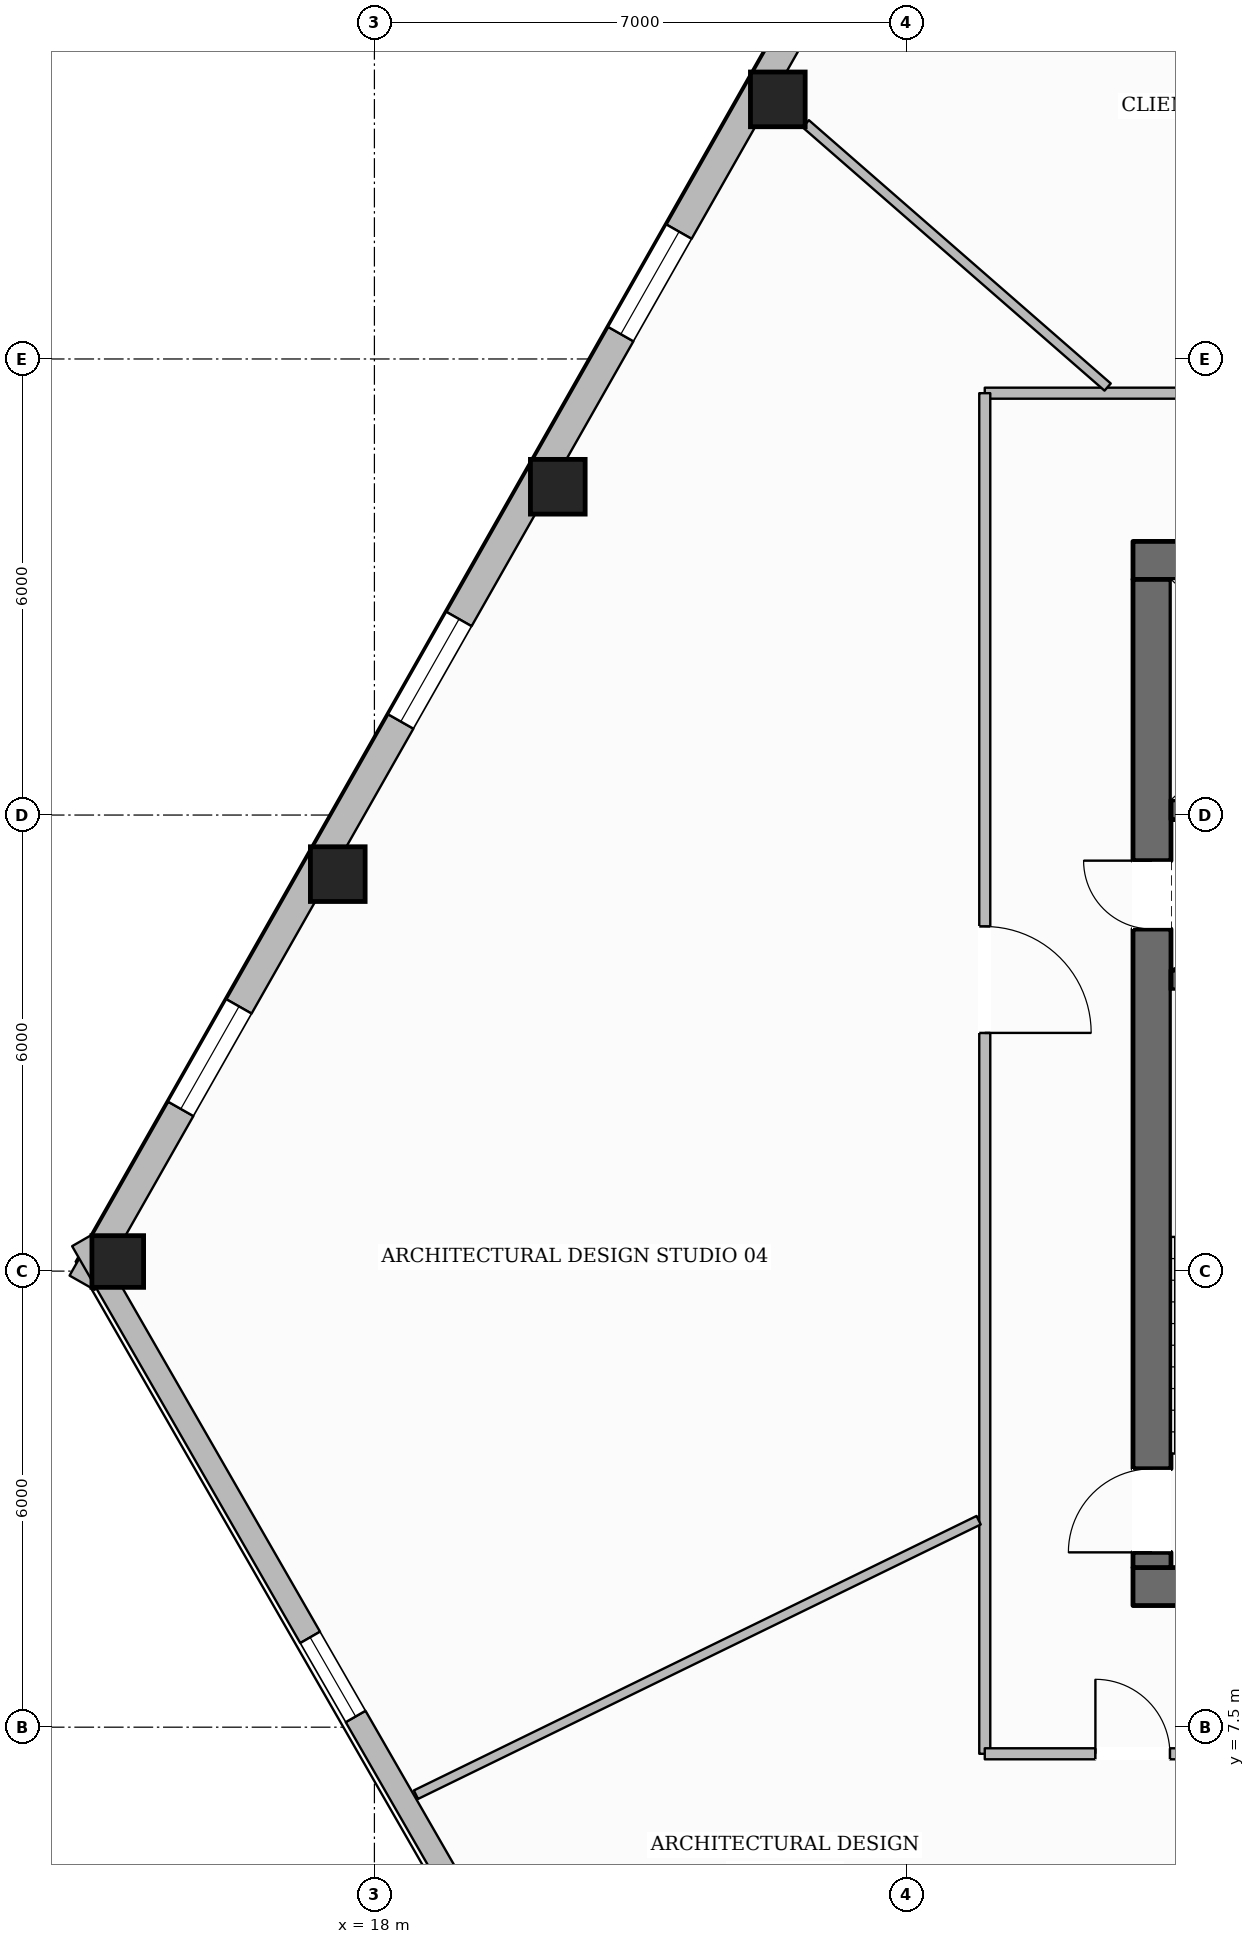
"""IFC4 building model, lengths in metres.
Left out: names, types, materials, properties, quantities, classifications, styles, units other than length and angle.
Written with IfcOpenShell. Run it as: python <this file> out.ifc"""

import sys

from ifc_helpers import new_model, si_unit, direction, frame, frame_2d, origin, origin_2d, place, context, subcontext, project, spatial, rectangle, hollow_rectangle, extrude, element, fill, save


model = new_model("IFC4")
c1 = context("Model", 3, precision=1e-05, world=origin(), true_north=direction((0.0, 1.0)))
c2 = subcontext(c1, "Body", "Model", "MODEL_VIEW")
j1 = project(units=[si_unit("LENGTHUNIT", "METRE"), si_unit("PLANEANGLEUNIT", "RADIAN")], contexts=[c1])
p1 = place(None, origin())
s1 = spatial("IfcSite", under=j1, at=p1, CompositionType="ELEMENT")
p2 = place(p1, origin())
s2 = spatial("IfcBuilding", under=s1, at=p2, CompositionType="ELEMENT")
p3 = place(p2, frame((0.0, 0.0, 108.6)))
s3 = spatial("IfcBuildingStorey", under=s2, at=p3, CompositionType="ELEMENT", Elevation=108.6)
p4 = place(p3, frame((27.98, 9.35, 0.0), z_axis=(0.0, 0.0, 1.0), x_axis=(1.0, 0.0, 0.0)))
e1 = element("IfcWall", 1, at=p4, inside=s3, PredefinedType="SOLIDWALL", context=c2, shape_type="SweptSolid", body=[
    extrude(rectangle(XDim=20.04, YDim=0.5, at=frame_2d((10.02, 0.0))), origin(), (0.0, 0.0, 1.0), 3.6),
])
p5 = place(p4, frame((10.52, 0.0, 0.0)))
e2 = element("IfcOpeningElement", 2, at=p5, cuts=e1, PredefinedType="OPENING", context=c2, shape_type="SweptSolid", body=[
    extrude(rectangle(XDim=1.4, YDim=2.2, at=frame_2d((0.7, 1.1))), frame((0.0, 0.26, 0.0), z_axis=(0.0, -1.0, 0.0), x_axis=(1.0, 0.0, 0.0)), (0.0, 0.0, 1.0), 0.52),
])
p6 = place(p3, frame((27.98, 22.85, 0.0), z_axis=(0.0, 0.0, 1.0), x_axis=(1.0, 0.0, 0.0)))
e3 = element("IfcWall", 3, at=p6, inside=s3, PredefinedType="SOLIDWALL", context=c2, shape_type="SweptSolid", body=[
    extrude(rectangle(XDim=20.04, YDim=0.5, at=frame_2d((10.02, 0.0))), origin(), (0.0, 0.0, 1.0), 3.6),
])
p7 = place(p6, frame((6.295, 0.0, 0.0)))
e4 = element("IfcOpeningElement", 4, at=p7, cuts=e3, PredefinedType="OPENING", context=c2, shape_type="SweptSolid", body=[
    extrude(rectangle(XDim=1.05, YDim=2.15, at=frame_2d((0.525, 1.075))), frame((0.0, 0.26, 0.0), z_axis=(0.0, -1.0, 0.0), x_axis=(1.0, 0.0, 0.0)), (0.0, 0.0, 1.0), 0.52),
])
p8 = place(p6, frame((12.695, 0.0, 0.0)))
e5 = element("IfcOpeningElement", 5, at=p8, cuts=e3, PredefinedType="OPENING", context=c2, shape_type="SweptSolid", body=[
    extrude(rectangle(XDim=1.05, YDim=2.15, at=frame_2d((0.525, 1.075))), frame((0.0, 0.26, 0.0), z_axis=(0.0, -1.0, 0.0), x_axis=(1.0, 0.0, 0.0)), (0.0, 0.0, 1.0), 0.52),
])
p9 = place(p3, frame((28.23, 9.6, 0.0), z_axis=(0.0, 0.0, 1.0), x_axis=(0.0, 1.0, 0.0)))
e6 = element("IfcWall", 6, at=p9, inside=s3, PredefinedType="SOLIDWALL", context=c2, shape_type="SweptSolid", body=[
    extrude(rectangle(XDim=13.0, YDim=0.5, at=frame_2d((6.5, 0.0))), origin(), (0.0, 0.0, 1.0), 3.6),
])
p10 = place(p9, frame((0.2, 0.0, 0.0)))
e7 = element("IfcOpeningElement", 7, at=p10, cuts=e6, PredefinedType="OPENING", context=c2, shape_type="SweptSolid", body=[
    extrude(rectangle(XDim=1.1, YDim=2.15, at=frame_2d((0.55, 1.075))), frame((0.0, 0.26, 0.0), z_axis=(0.0, -1.0, 0.0), x_axis=(1.0, 0.0, 0.0)), (0.0, 0.0, 1.0), 0.52),
])
p11 = place(p9, frame((8.4, 0.0, 0.0)))
e8 = element("IfcOpeningElement", 8, at=p11, cuts=e6, PredefinedType="OPENING", context=c2, shape_type="SweptSolid", body=[
    extrude(rectangle(XDim=0.9, YDim=2.1, at=frame_2d((0.45, 1.05))), frame((0.0, 0.26, 0.0), z_axis=(0.0, -1.0, 0.0), x_axis=(1.0, 0.0, 0.0)), (0.0, 0.0, 1.0), 0.52),
])
for number, where, z_axis, x_axis in (
    (9, (28.48, 17.33, 0.0), (0.0, 0.0, 1.0), (1.0, 0.0, 0.0)),
    (10, (28.48, 19.57, 0.0), (0.0, 0.0, 1.0), (1.0, 0.0, 0.0)),
):
    element("IfcWall", number, at=place(p3, frame(where, z_axis=z_axis, x_axis=x_axis)), inside=s3, PredefinedType="SHEAR", context=c2, shape_type="SweptSolid", body=[
        extrude(rectangle(XDim=3.2, YDim=0.26, at=frame_2d((1.6, 0.0))), origin(), (0.0, 0.0, 1.0), 3.6),
    ])
for number, where, z_axis, x_axis in (
    (11, (23.307, 28.915, 0.0), (0.0, 0.0, 1.0), (1.0, 0.0, 0.0)),
    (12, (20.413, 23.819, 0.0), (0.0, 0.0, 1.0), (1.0, 0.0, 0.0)),
    (13, (17.518, 18.723, 0.0), (0.0, 0.0, 1.0), (1.0, 0.0, 0.0)),
):
    element("IfcColumn", number, at=place(p3, frame(where, z_axis=z_axis, x_axis=x_axis)), inside=s3, PredefinedType="COLUMN", context=c2, shape_type="SweptSolid", body=[
        extrude(hollow_rectangle(XDim=0.72, YDim=0.72, WallThickness=0.032, at=origin_2d()), origin(), (0.0, 0.0, 1.0), 3.6),
    ])
p12 = place(p3, frame((14.624, 13.626, 0.0), z_axis=(0.0, 0.0, 1.0), x_axis=(1.0, 0.0, 0.0)))
e14 = element("IfcColumn", 14, at=p12, inside=s3, PredefinedType="COLUMN", context=c2, shape_type="SweptSolid", body=[
    extrude(hollow_rectangle(XDim=0.68, YDim=0.68, WallThickness=0.03, at=origin_2d()), origin(), (0.0, 0.0, 1.0), 3.6),
])
p13 = place(p3, frame((14.155, 13.347, 0.0), z_axis=(0.0, 0.0, 1.0), x_axis=(0.493868426836, 0.869536644986, 0.0)))
e15 = element("IfcWall", 15, at=p13, inside=s3, PredefinedType="STANDARD", context=c2, shape_type="SweptSolid", body=[
    extrude(rectangle(XDim=36.121, YDim=0.38, at=frame_2d((18.061, 0.0))), origin(), (0.0, 0.0, 1.0), 3.059),
])
p14 = place(p13, frame((31.935, 0.0, 0.65)))
e16 = element("IfcOpeningElement", 16, at=p14, cuts=e15, PredefinedType="OPENING", context=c2, shape_type="SweptSolid", body=[
    extrude(rectangle(XDim=1.55, YDim=1.75, at=frame_2d((0.775, 0.875))), frame((0.0, 0.2, 0.0), z_axis=(0.0, -1.0, 0.0), x_axis=(1.0, 0.0, 0.0)), (0.0, 0.0, 1.0), 0.4),
])
p15 = place(p13, frame((26.073, 0.0, 0.65)))
e17 = element("IfcOpeningElement", 17, at=p15, cuts=e15, PredefinedType="OPENING", context=c2, shape_type="SweptSolid", body=[
    extrude(rectangle(XDim=1.55, YDim=1.75, at=frame_2d((0.775, 0.875))), frame((0.0, 0.2, 0.0), z_axis=(0.0, -1.0, 0.0), x_axis=(1.0, 0.0, 0.0)), (0.0, 0.0, 1.0), 0.4),
])
p16 = place(p13, frame((14.352, 0.0, 0.65)))
e18 = element("IfcOpeningElement", 18, at=p16, cuts=e15, PredefinedType="OPENING", context=c2, shape_type="SweptSolid", body=[
    extrude(rectangle(XDim=1.55, YDim=1.75, at=frame_2d((0.775, 0.875))), frame((0.0, 0.2, 0.0), z_axis=(0.0, -1.0, 0.0), x_axis=(1.0, 0.0, 0.0)), (0.0, 0.0, 1.0), 0.4),
])
p17 = place(p13, frame((8.491, 0.0, 0.65)))
e19 = element("IfcOpeningElement", 19, at=p17, cuts=e15, PredefinedType="OPENING", context=c2, shape_type="SweptSolid", body=[
    extrude(rectangle(XDim=1.55, YDim=1.75, at=frame_2d((0.775, 0.875))), frame((0.0, 0.2, 0.0), z_axis=(0.0, -1.0, 0.0), x_axis=(1.0, 0.0, 0.0)), (0.0, 0.0, 1.0), 0.4),
])
p18 = place(p13, frame((2.63, 0.0, 0.65)))
e20 = element("IfcOpeningElement", 20, at=p18, cuts=e15, PredefinedType="OPENING", context=c2, shape_type="SweptSolid", body=[
    extrude(rectangle(XDim=1.55, YDim=1.75, at=frame_2d((0.775, 0.875))), frame((0.0, 0.2, 0.0), z_axis=(0.0, -1.0, 0.0), x_axis=(1.0, 0.0, 0.0)), (0.0, 0.0, 1.0), 0.4),
])
p19 = place(p3, frame((20.754, 2.419, 0.0), z_axis=(0.0, 0.0, 1.0), x_axis=(-0.49837034912, 0.866964240969, 0.0)))
e21 = element("IfcWall", 21, at=p19, inside=s3, PredefinedType="STANDARD", context=c2, shape_type="SweptSolid", body=[
    extrude(rectangle(XDim=13.246, YDim=0.3, at=frame_2d((6.623, 0.0))), origin(), (0.0, 0.0, 1.0), 3.059),
])
p20 = place(p19, frame((6.023, 0.0, 0.65)))
e22 = element("IfcOpeningElement", 22, at=p20, cuts=e21, PredefinedType="OPENING", context=c2, shape_type="SweptSolid", body=[
    extrude(rectangle(XDim=1.2, YDim=1.7, at=frame_2d((0.6, 0.85))), frame((0.0, 0.16, 0.0), z_axis=(0.0, -1.0, 0.0), x_axis=(1.0, 0.0, 0.0)), (0.0, 0.0, 1.0), 0.32),
])
p21 = place(p3, frame((49.97, 25.05, 0.0), z_axis=(0.0, 0.0, 1.0), x_axis=(-1.0, 0.0, 0.0)))
e23 = element("IfcWall", 23, at=p21, inside=s3, PredefinedType="PARTITIONING", context=c2, shape_type="SweptSolid", body=[
    extrude(rectangle(XDim=23.94, YDim=0.145, at=frame_2d((11.97, 0.0))), origin(), (0.0, 0.0, 1.0), 3.6),
])
p22 = place(p21, frame((5.824, 0.0, 0.0)))
e24 = element("IfcOpeningElement", 24, at=p22, cuts=e23, PredefinedType="OPENING", context=c2, shape_type="SweptSolid", body=[
    extrude(rectangle(XDim=1.4, YDim=2.2, at=frame_2d((0.7, 1.1))), frame((0.0, 0.083, 0.0), z_axis=(0.0, -1.0, 0.0), x_axis=(1.0, 0.0, 0.0)), (0.0, 0.0, 1.0), 0.165),
])
p23 = place(p21, frame((16.238, 0.0, 0.0)))
e25 = element("IfcOpeningElement", 25, at=p23, cuts=e23, PredefinedType="OPENING", context=c2, shape_type="SweptSolid", body=[
    extrude(rectangle(XDim=1.4, YDim=2.2, at=frame_2d((0.7, 1.1))), frame((0.0, 0.083, 0.0), z_axis=(0.0, -1.0, 0.0), x_axis=(1.0, 0.0, 0.0)), (0.0, 0.0, 1.0), 0.165),
])
p24 = place(p3, frame((26.03, 25.05, 0.0), z_axis=(0.0, 0.0, 1.0), x_axis=(0.0, -1.0, 0.0)))
e26 = element("IfcWall", 26, at=p24, inside=s3, PredefinedType="PARTITIONING", context=c2, shape_type="SweptSolid", body=[
    extrude(rectangle(XDim=17.9, YDim=0.145, at=frame_2d((8.95, 0.0))), origin(), (0.0, 0.0, 1.0), 3.288),
])
p25 = place(p24, frame((7.016, 0.0, 0.0)))
e27 = element("IfcOpeningElement", 27, at=p25, cuts=e26, PredefinedType="OPENING", context=c2, shape_type="SweptSolid", body=[
    extrude(rectangle(XDim=1.4, YDim=2.2, at=frame_2d((0.7, 1.1))), frame((0.0, 0.083, 0.0), z_axis=(0.0, -1.0, 0.0), x_axis=(1.0, 0.0, 0.0)), (0.0, 0.0, 1.0), 0.165),
])
p26 = place(p3, frame((26.03, 7.15, 0.0), z_axis=(0.0, 0.0, 1.0), x_axis=(1.0, 0.0, 0.0)))
e28 = element("IfcWall", 28, at=p26, inside=s3, PredefinedType="PARTITIONING", context=c2, shape_type="SweptSolid", body=[
    extrude(rectangle(XDim=23.94, YDim=0.145, at=frame_2d((11.97, 0.0))), origin(), (0.0, 0.0, 1.0), 3.6),
])
p27 = place(p26, frame((4.53, 0.0, 0.0)))
e29 = element("IfcOpeningElement", 29, at=p27, cuts=e28, PredefinedType="OPENING", context=c2, shape_type="SweptSolid", body=[
    extrude(rectangle(XDim=0.88, YDim=2.1, at=frame_2d((0.44, 1.05))), frame((0.0, 0.083, 0.0), z_axis=(0.0, -1.0, 0.0), x_axis=(1.0, 0.0, 0.0)), (0.0, 0.0, 1.0), 0.165),
])
p28 = place(p26, frame((7.05, 0.0, 0.0)))
e30 = element("IfcOpeningElement", 30, at=p28, cuts=e28, PredefinedType="OPENING", context=c2, shape_type="SweptSolid", body=[
    extrude(rectangle(XDim=0.88, YDim=2.1, at=frame_2d((0.44, 1.05))), frame((0.0, 0.083, 0.0), z_axis=(0.0, -1.0, 0.0), x_axis=(1.0, 0.0, 0.0)), (0.0, 0.0, 1.0), 0.165),
])
p29 = place(p26, frame((9.43, 0.0, 0.0)))
e31 = element("IfcOpeningElement", 31, at=p29, cuts=e28, PredefinedType="OPENING", context=c2, shape_type="SweptSolid", body=[
    extrude(rectangle(XDim=0.96, YDim=2.1, at=frame_2d((0.48, 1.05))), frame((0.0, 0.083, 0.0), z_axis=(0.0, -1.0, 0.0), x_axis=(1.0, 0.0, 0.0)), (0.0, 0.0, 1.0), 0.165),
])
p30 = place(p26, frame((1.456, 0.0, 0.0)))
e32 = element("IfcOpeningElement", 32, at=p30, cuts=e28, PredefinedType="OPENING", context=c2, shape_type="SweptSolid", body=[
    extrude(rectangle(XDim=0.98, YDim=2.15, at=frame_2d((0.49, 1.075))), frame((0.0, 0.083, 0.0), z_axis=(0.0, -1.0, 0.0), x_axis=(1.0, 0.0, 0.0)), (0.0, 0.0, 1.0), 0.165),
])
p31 = place(p26, frame((16.714, 0.0, 0.0)))
e33 = element("IfcOpeningElement", 33, at=p31, cuts=e28, PredefinedType="OPENING", context=c2, shape_type="SweptSolid", body=[
    extrude(rectangle(XDim=1.4, YDim=2.2, at=frame_2d((0.7, 1.1))), frame((0.0, 0.083, 0.0), z_axis=(0.0, -1.0, 0.0), x_axis=(1.0, 0.0, 0.0)), (0.0, 0.0, 1.0), 0.165),
])
p32 = place(p3, frame((27.646, 25.131, 0.0), z_axis=(0.0, 0.0, 1.0), x_axis=(-0.753603237889, 0.657329567145, 0.0)))
e34 = element("IfcWall", 34, at=p32, inside=s3, PredefinedType="PARTITIONING", context=c2, shape_type="SweptSolid", body=[
    extrude(rectangle(XDim=5.27, YDim=0.125, at=frame_2d((2.635, 0.0))), origin(), (0.0, 0.0, 1.0), 3.141),
])
p33 = place(p3, frame((25.949, 10.223, 0.0), z_axis=(0.0, 0.0, 1.0), x_axis=(-0.898788385453, -0.438382753054, 0.0)))
e35 = element("IfcWall", 35, at=p33, inside=s3, PredefinedType="PARTITIONING", context=c2, shape_type="SweptSolid", body=[
    extrude(rectangle(XDim=8.237, YDim=0.125, at=frame_2d((4.118, 0.0))), origin(), (0.0, 0.0, 1.0), 3.6),
])
p34 = place(p16, origin())
e36 = element("IfcWindow", 36, at=p34, inside=s3, PartitioningType="SINGLE_PANEL", PredefinedType="WINDOW", context=c2, shape_type="SweptSolid", body=[
    extrude(rectangle(XDim=1.55, YDim=1.75, at=frame_2d((0.775, 0.875))), frame((0.0, 0.03, 0.0), z_axis=(0.0, -1.0, 0.0), x_axis=(1.0, 0.0, 0.0)), (0.0, 0.0, 1.0), 0.06),
])
fill(e18, e36)
p35 = place(p17, origin())
e37 = element("IfcWindow", 37, at=p35, inside=s3, PartitioningType="SINGLE_PANEL", PredefinedType="WINDOW", context=c2, shape_type="SweptSolid", body=[
    extrude(rectangle(XDim=1.55, YDim=1.75, at=frame_2d((0.775, 0.875))), frame((0.0, 0.03, 0.0), z_axis=(0.0, -1.0, 0.0), x_axis=(1.0, 0.0, 0.0)), (0.0, 0.0, 1.0), 0.06),
])
fill(e19, e37)
p36 = place(p18, origin())
e38 = element("IfcWindow", 38, at=p36, inside=s3, PartitioningType="SINGLE_PANEL", PredefinedType="WINDOW", context=c2, shape_type="SweptSolid", body=[
    extrude(rectangle(XDim=1.55, YDim=1.75, at=frame_2d((0.775, 0.875))), frame((0.0, 0.03, 0.0), z_axis=(0.0, -1.0, 0.0), x_axis=(1.0, 0.0, 0.0)), (0.0, 0.0, 1.0), 0.06),
])
fill(e20, e38)
p37 = place(p20, origin())
e39 = element("IfcWindow", 39, at=p37, inside=s3, PartitioningType="SINGLE_PANEL", PredefinedType="WINDOW", context=c2, shape_type="SweptSolid", body=[
    extrude(rectangle(XDim=1.2, YDim=1.7, at=frame_2d((0.6, 0.85))), frame((0.0, 0.03, 0.0), z_axis=(0.0, -1.0, 0.0), x_axis=(1.0, 0.0, 0.0)), (0.0, 0.0, 1.0), 0.06),
])
fill(e22, e39)
p38 = place(p10, origin())
e40 = element("IfcDoor", 40, at=p38, inside=s3, OperationType="SINGLE_SWING_LEFT", PredefinedType="DOOR", context=c2, shape_type="SweptSolid", body=[
    extrude(rectangle(XDim=1.1, YDim=2.15, at=frame_2d((0.55, 1.075))), frame((0.0, 0.025, 0.0), z_axis=(0.0, -1.0, 0.0), x_axis=(1.0, 0.0, 0.0)), (0.0, 0.0, 1.0), 0.05),
])
fill(e7, e40)
p39 = place(p11, origin())
e41 = element("IfcDoor", 41, at=p39, inside=s3, OperationType="SINGLE_SWING_RIGHT", PredefinedType="DOOR", context=c2, shape_type="SweptSolid", body=[
    extrude(rectangle(XDim=0.9, YDim=2.1, at=frame_2d((0.45, 1.05))), frame((0.0, 0.025, 0.0), z_axis=(0.0, -1.0, 0.0), x_axis=(1.0, 0.0, 0.0)), (0.0, 0.0, 1.0), 0.05),
])
fill(e8, e41)
p40 = place(p25, origin())
e42 = element("IfcDoor", 42, at=p40, inside=s3, OperationType="SINGLE_SWING_RIGHT", PredefinedType="DOOR", context=c2, shape_type="SweptSolid", body=[
    extrude(rectangle(XDim=1.4, YDim=2.2, at=frame_2d((0.7, 1.1))), frame((0.0, 0.025, 0.0), z_axis=(0.0, -1.0, 0.0), x_axis=(1.0, 0.0, 0.0)), (0.0, 0.0, 1.0), 0.05),
])
fill(e27, e42)
p41 = place(p30, origin())
e43 = element("IfcDoor", 43, at=p41, inside=s3, OperationType="SINGLE_SWING_LEFT", PredefinedType="DOOR", context=c2, shape_type="SweptSolid", body=[
    extrude(rectangle(XDim=0.98, YDim=2.15, at=frame_2d((0.49, 1.075))), frame((0.0, 0.025, 0.0), z_axis=(0.0, -1.0, 0.0), x_axis=(1.0, 0.0, 0.0)), (0.0, 0.0, 1.0), 0.05),
])
fill(e32, e43)
save(model, sys.argv[1])
